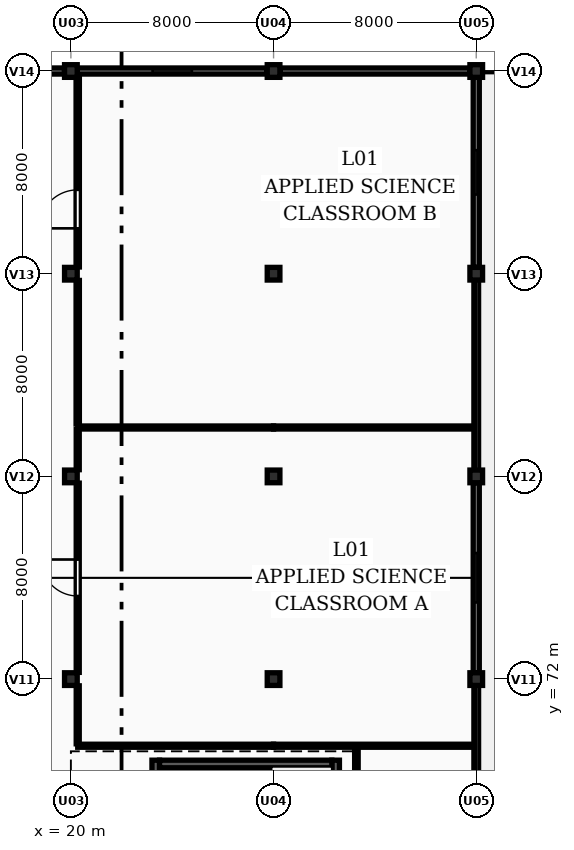
"""IFC4 building model, lengths in metres.
Left out: names, types, materials, properties, quantities, classifications, styles, units other than length and angle.
Written with IfcOpenShell. Run it as: python <this file> out.ifc"""

import sys

from ifc_helpers import new_model, si_unit, direction, frame, frame_2d, origin, origin_2d, place, context, subcontext, project, spatial, rectangle, extrude, element, fill, save


model = new_model("IFC4")
c1 = context("Model", 3, precision=1e-05, world=origin(), true_north=direction((0.0, 1.0)))
c2 = subcontext(c1, "Body", "Model", "MODEL_VIEW")
j1 = project(units=[si_unit("LENGTHUNIT", "METRE"), si_unit("PLANEANGLEUNIT", "RADIAN")], contexts=[c1])
p1 = place(None, origin())
s1 = spatial("IfcSite", under=j1, at=p1, CompositionType="ELEMENT")
p2 = place(p1, origin())
s2 = spatial("IfcBuilding", under=s1, at=p2, CompositionType="ELEMENT")
p3 = place(p2, frame((0.0, 0.0, 4.5)))
s3 = spatial("IfcBuildingStorey", under=s2, at=p3, CompositionType="ELEMENT", Elevation=4.5)
for number, where, z_axis, x_axis in (
    (1, (20.0, 72.0, 0.0), (0.0, 0.0, 1.0), (1.0, 0.0, 0.0)),
    (2, (20.0, 80.0, 0.0), (0.0, 0.0, 1.0), (1.0, 0.0, 0.0)),
    (3, (20.0, 88.0, 0.0), (0.0, 0.0, 1.0), (1.0, 0.0, 0.0)),
    (4, (20.0, 96.0, 0.0), (0.0, 0.0, 1.0), (1.0, 0.0, 0.0)),
    (5, (28.0, 72.0, 0.0), (0.0, 0.0, 1.0), (1.0, 0.0, 0.0)),
    (6, (28.0, 80.0, 0.0), (0.0, 0.0, 1.0), (1.0, 0.0, 0.0)),
    (7, (28.0, 88.0, 0.0), (0.0, 0.0, 1.0), (1.0, 0.0, 0.0)),
    (8, (28.0, 96.0, 0.0), (0.0, 0.0, 1.0), (1.0, 0.0, 0.0)),
    (9, (36.0, 72.0, 0.0), (0.0, 0.0, 1.0), (1.0, 0.0, 0.0)),
    (10, (36.0, 80.0, 0.0), (0.0, 0.0, 1.0), (1.0, 0.0, 0.0)),
    (11, (36.0, 88.0, 0.0), (0.0, 0.0, 1.0), (1.0, 0.0, 0.0)),
    (12, (36.0, 96.0, 0.0), (0.0, 0.0, 1.0), (1.0, 0.0, 0.0)),
):
    element("IfcColumn", number, at=place(p3, frame(where, z_axis=z_axis, x_axis=x_axis)), inside=s3, PredefinedType="COLUMN", context=c2, shape_type="SweptSolid", body=[
        extrude(rectangle(XDim=0.5, YDim=0.5, at=origin_2d()), origin(), (0.0, 0.0, 1.0), 3.9),
    ])
p4 = place(p3, frame((12.25, 96.0, 0.0), z_axis=(0.0, 0.0, 1.0), x_axis=(1.0, 0.0, 0.0)))
e13 = element("IfcWall", 13, at=p4, inside=s3, PredefinedType="SOLIDWALL", context=c2, shape_type="SweptSolid", body=[
    extrude(rectangle(XDim=7.5, YDim=0.24, at=frame_2d((3.75, 0.0))), origin(), (0.0, 0.0, 1.0), 3.0),
])
p5 = place(p4, frame((2.65, 0.0, 0.95)))
e14 = element("IfcOpeningElement", 14, at=p5, cuts=e13, PredefinedType="OPENING", context=c2, shape_type="SweptSolid", body=[
    extrude(rectangle(XDim=1.3, YDim=1.4, at=frame_2d((0.65, 0.7))), frame((0.0, 0.13, 0.0), z_axis=(0.0, -1.0, 0.0), x_axis=(1.0, 0.0, 0.0)), (0.0, 0.0, 1.0), 0.26),
])
p6 = place(p3, frame((20.25, 96.0, 0.0), z_axis=(0.0, 0.0, 1.0), x_axis=(1.0, 0.0, 0.0)))
e15 = element("IfcWall", 15, at=p6, inside=s3, PredefinedType="SOLIDWALL", context=c2, shape_type="SweptSolid", body=[
    extrude(rectangle(XDim=7.5, YDim=0.24, at=frame_2d((3.75, 0.0))), origin(), (0.0, 0.0, 1.0), 3.0),
])
p7 = place(p6, frame((2.975, 0.0, 0.95)))
e16 = element("IfcOpeningElement", 16, at=p7, cuts=e15, PredefinedType="OPENING", context=c2, shape_type="SweptSolid", body=[
    extrude(rectangle(XDim=1.55, YDim=1.4, at=frame_2d((0.775, 0.7))), frame((0.0, 0.13, 0.0), z_axis=(0.0, -1.0, 0.0), x_axis=(1.0, 0.0, 0.0)), (0.0, 0.0, 1.0), 0.26),
])
p8 = place(p3, frame((28.25, 96.0, 0.0), z_axis=(0.0, 0.0, 1.0), x_axis=(1.0, 0.0, 0.0)))
e17 = element("IfcWall", 17, at=p8, inside=s3, PredefinedType="SOLIDWALL", context=c2, shape_type="SweptSolid", body=[
    extrude(rectangle(XDim=7.5, YDim=0.24, at=frame_2d((3.75, 0.0))), origin(), (0.0, 0.0, 1.0), 3.0),
])
p9 = place(p3, frame((36.0, 95.75, 0.0), z_axis=(0.0, 0.0, 1.0), x_axis=(0.0, -1.0, 0.0)))
e18 = element("IfcWall", 18, at=p9, inside=s3, PredefinedType="SOLIDWALL", context=c2, shape_type="SweptSolid", body=[
    extrude(rectangle(XDim=7.5, YDim=0.24, at=frame_2d((3.75, 0.0))), origin(), (0.0, 0.0, 1.0), 3.0),
])
p10 = place(p9, frame((2.875, 0.0, 0.95)))
e19 = element("IfcOpeningElement", 19, at=p10, cuts=e18, PredefinedType="OPENING", context=c2, shape_type="SweptSolid", body=[
    extrude(rectangle(XDim=1.75, YDim=1.4, at=frame_2d((0.875, 0.7))), frame((0.0, 0.13, 0.0), z_axis=(0.0, -1.0, 0.0), x_axis=(1.0, 0.0, 0.0)), (0.0, 0.0, 1.0), 0.26),
])
p11 = place(p3, frame((36.0, 87.75, 0.0), z_axis=(0.0, 0.0, 1.0), x_axis=(0.0, -1.0, 0.0)))
e20 = element("IfcWall", 20, at=p11, inside=s3, PredefinedType="SOLIDWALL", context=c2, shape_type="SweptSolid", body=[
    extrude(rectangle(XDim=7.5, YDim=0.185, at=frame_2d((3.75, 0.0))), origin(), (0.0, 0.0, 1.0), 0.95),
])
p12 = place(p3, frame((36.0, 79.75, 0.0), z_axis=(0.0, 0.0, 1.0), x_axis=(0.0, -1.0, 0.0)))
e21 = element("IfcWall", 21, at=p12, inside=s3, PredefinedType="SOLIDWALL", context=c2, shape_type="SweptSolid", body=[
    extrude(rectangle(XDim=7.5, YDim=0.24, at=frame_2d((3.75, 0.0))), origin(), (0.0, 0.0, 1.0), 3.0),
])
p13 = place(p12, frame((2.775, 0.0, 0.95)))
e22 = element("IfcOpeningElement", 22, at=p13, cuts=e21, PredefinedType="OPENING", context=c2, shape_type="SweptSolid", body=[
    extrude(rectangle(XDim=1.95, YDim=1.4, at=frame_2d((0.975, 0.7))), frame((0.0, 0.13, 0.0), z_axis=(0.0, -1.0, 0.0), x_axis=(1.0, 0.0, 0.0)), (0.0, 0.0, 1.0), 0.26),
])
p14 = place(p3, frame((36.0, 71.75, 0.0), z_axis=(0.0, 0.0, 1.0), x_axis=(0.0, -1.0, 0.0)))
e23 = element("IfcWall", 23, at=p14, inside=s3, PredefinedType="SOLIDWALL", context=c2, shape_type="SweptSolid", body=[
    extrude(rectangle(XDim=7.5, YDim=0.185, at=frame_2d((3.75, 0.0))), origin(), (0.0, 0.0, 1.0), 0.95),
])
for number, where, z_axis, x_axis in (
    (24, (23.35, 64.7, 0.0), (0.0, 0.0, 1.0), (0.0, 1.0, 0.0)),
    (25, (30.45, 68.8, 0.0), (0.0, 0.0, 1.0), (0.0, -1.0, 0.0)),
):
    element("IfcWall", number, at=place(p3, frame(where, z_axis=z_axis, x_axis=x_axis)), inside=s3, PredefinedType="SHEAR", context=c2, shape_type="SweptSolid", body=[
        extrude(rectangle(XDim=4.1, YDim=0.3, at=frame_2d((2.05, 0.0))), origin(), (0.0, 0.0, 1.0), 3.65),
    ])
p15 = place(p3, frame((30.3, 68.65, 0.0), z_axis=(0.0, 0.0, 1.0), x_axis=(-1.0, 0.0, 0.0)))
e26 = element("IfcWall", 26, at=p15, inside=s3, PredefinedType="SHEAR", context=c2, shape_type="SweptSolid", body=[
    extrude(rectangle(XDim=6.8, YDim=0.3, at=frame_2d((3.4, 0.0))), origin(), (0.0, 0.0, 1.0), 3.65),
])
p16 = place(p3, frame((20.27, 69.37, 0.0), z_axis=(0.0, 0.0, 1.0), x_axis=(1.0, 0.0, 0.0)))
e27 = element("IfcWall", 27, at=p16, inside=s3, PredefinedType="PARTITIONING", context=c2, shape_type="SweptSolid", body=[
    extrude(rectangle(XDim=7.73, YDim=0.12, at=frame_2d((3.865, 0.0))), origin(), (0.0, 0.0, 1.0), 3.65),
])
p17 = place(p3, frame((28.0, 69.37, 0.0), z_axis=(0.0, 0.0, 1.0), x_axis=(1.0, 0.0, 0.0)))
e28 = element("IfcWall", 28, at=p17, inside=s3, PredefinedType="PARTITIONING", context=c2, shape_type="SweptSolid", body=[
    extrude(rectangle(XDim=7.865, YDim=0.12, at=frame_2d((3.933, 0.0))), origin(), (0.0, 0.0, 1.0), 3.65),
])
p18 = place(p3, frame((20.27, 81.93, 0.0), z_axis=(0.0, 0.0, 1.0), x_axis=(1.0, 0.0, 0.0)))
e29 = element("IfcWall", 29, at=p18, inside=s3, PredefinedType="PARTITIONING", context=c2, shape_type="SweptSolid", body=[
    extrude(rectangle(XDim=7.73, YDim=0.12, at=frame_2d((3.865, 0.0))), origin(), (0.0, 0.0, 1.0), 3.65),
])
p19 = place(p3, frame((28.0, 81.93, 0.0), z_axis=(0.0, 0.0, 1.0), x_axis=(1.0, 0.0, 0.0)))
e30 = element("IfcWall", 30, at=p19, inside=s3, PredefinedType="PARTITIONING", context=c2, shape_type="SweptSolid", body=[
    extrude(rectangle(XDim=7.865, YDim=0.12, at=frame_2d((3.933, 0.0))), origin(), (0.0, 0.0, 1.0), 3.65),
])
p20 = place(p3, frame((20.27, 69.445, 0.0), z_axis=(0.0, 0.0, 1.0), x_axis=(0.0, 1.0, 0.0)))
e31 = element("IfcWall", 31, at=p20, inside=s3, PredefinedType="PARTITIONING", context=c2, shape_type="SweptSolid", body=[
    extrude(rectangle(XDim=2.29, YDim=0.12, at=frame_2d((1.145, 0.0))), origin(), (0.0, 0.0, 1.0), 3.0),
])
p21 = place(p3, frame((20.27, 72.265, 0.0), z_axis=(0.0, 0.0, 1.0), x_axis=(0.0, 1.0, 0.0)))
e32 = element("IfcWall", 32, at=p21, inside=s3, PredefinedType="PARTITIONING", context=c2, shape_type="SweptSolid", body=[
    extrude(rectangle(XDim=7.47, YDim=0.12, at=frame_2d((3.735, 0.0))), origin(), (0.0, 0.0, 1.0), 3.0),
])
p22 = place(p21, frame((3.015, 0.0, 0.0)))
e33 = element("IfcOpeningElement", 33, at=p22, cuts=e32, PredefinedType="OPENING", context=c2, shape_type="SweptSolid", body=[
    extrude(rectangle(XDim=1.44, YDim=2.15, at=frame_2d((0.72, 1.075))), frame((0.0, 0.07, 0.0), z_axis=(0.0, -1.0, 0.0), x_axis=(1.0, 0.0, 0.0)), (0.0, 0.0, 1.0), 0.14),
])
p23 = place(p3, frame((20.27, 80.265, 0.0), z_axis=(0.0, 0.0, 1.0), x_axis=(0.0, 1.0, 0.0)))
e34 = element("IfcWall", 34, at=p23, inside=s3, PredefinedType="PARTITIONING", context=c2, shape_type="SweptSolid", body=[
    extrude(rectangle(XDim=1.59, YDim=0.12, at=frame_2d((0.795, 0.0))), origin(), (0.0, 0.0, 1.0), 3.0),
])
p24 = place(p3, frame((20.27, 82.07, 0.0), z_axis=(0.0, 0.0, 1.0), x_axis=(0.0, 1.0, 0.0)))
e35 = element("IfcWall", 35, at=p24, inside=s3, PredefinedType="PARTITIONING", context=c2, shape_type="SweptSolid", body=[
    extrude(rectangle(XDim=5.665, YDim=0.13, at=frame_2d((2.833, 0.0))), origin(), (0.0, 0.0, 1.0), 3.0),
])
p25 = place(p3, frame((20.27, 88.265, 0.0), z_axis=(0.0, 0.0, 1.0), x_axis=(0.0, 1.0, 0.0)))
e36 = element("IfcWall", 36, at=p25, inside=s3, PredefinedType="PARTITIONING", context=c2, shape_type="SweptSolid", body=[
    extrude(rectangle(XDim=7.47, YDim=0.13, at=frame_2d((3.735, 0.0))), origin(), (0.0, 0.0, 1.0), 3.0),
])
p26 = place(p25, frame((1.525, 0.0, 0.0)))
e37 = element("IfcOpeningElement", 37, at=p26, cuts=e36, PredefinedType="OPENING", context=c2, shape_type="SweptSolid", body=[
    extrude(rectangle(XDim=1.52, YDim=2.2, at=frame_2d((0.76, 1.1))), frame((0.0, 0.075, 0.0), z_axis=(0.0, -1.0, 0.0), x_axis=(1.0, 0.0, 0.0)), (0.0, 0.0, 1.0), 0.15),
])
p27 = place(p3, frame((31.27, 64.755, 0.0), z_axis=(0.0, 0.0, 1.0), x_axis=(0.0, 1.0, 0.0)))
e38 = element("IfcWall", 38, at=p27, inside=s3, PredefinedType="PARTITIONING", context=c2, shape_type="SweptSolid", body=[
    extrude(rectangle(XDim=4.475, YDim=0.14, at=frame_2d((2.238, 0.0))), origin(), (0.0, 0.0, 1.0), 3.65),
])
p28 = place(p7, origin())
e39 = element("IfcWindow", 39, at=p28, inside=s3, PartitioningType="SINGLE_PANEL", PredefinedType="WINDOW", context=c2, shape_type="SweptSolid", body=[
    extrude(rectangle(XDim=1.55, YDim=1.4, at=frame_2d((0.775, 0.7))), frame((0.0, 0.03, 0.0), z_axis=(0.0, -1.0, 0.0), x_axis=(1.0, 0.0, 0.0)), (0.0, 0.0, 1.0), 0.06),
])
fill(e16, e39)
p29 = place(p10, origin())
e40 = element("IfcWindow", 40, at=p29, inside=s3, PartitioningType="DOUBLE_PANEL_VERTICAL", PredefinedType="WINDOW", context=c2, shape_type="SweptSolid", body=[
    extrude(rectangle(XDim=1.75, YDim=1.4, at=frame_2d((0.875, 0.7))), frame((0.0, 0.03, 0.0), z_axis=(0.0, -1.0, 0.0), x_axis=(1.0, 0.0, 0.0)), (0.0, 0.0, 1.0), 0.06),
])
fill(e19, e40)
p30 = place(p13, origin())
e41 = element("IfcWindow", 41, at=p30, inside=s3, PartitioningType="DOUBLE_PANEL_VERTICAL", PredefinedType="WINDOW", context=c2, shape_type="SweptSolid", body=[
    extrude(rectangle(XDim=1.95, YDim=1.4, at=frame_2d((0.975, 0.7))), frame((0.0, 0.03, 0.0), z_axis=(0.0, -1.0, 0.0), x_axis=(1.0, 0.0, 0.0)), (0.0, 0.0, 1.0), 0.06),
])
fill(e22, e41)
p31 = place(p22, origin())
e42 = element("IfcDoor", 42, at=p31, inside=s3, OperationType="SINGLE_SWING_RIGHT", PredefinedType="DOOR", context=c2, shape_type="SweptSolid", body=[
    extrude(rectangle(XDim=1.44, YDim=2.15, at=frame_2d((0.72, 1.075))), frame((0.0, 0.025, 0.0), z_axis=(0.0, -1.0, 0.0), x_axis=(1.0, 0.0, 0.0)), (0.0, 0.0, 1.0), 0.05),
])
fill(e33, e42)
p32 = place(p26, origin())
e43 = element("IfcDoor", 43, at=p32, inside=s3, OperationType="SINGLE_SWING_LEFT", PredefinedType="DOOR", context=c2, shape_type="SweptSolid", body=[
    extrude(rectangle(XDim=1.52, YDim=2.2, at=frame_2d((0.76, 1.1))), frame((0.0, 0.025, 0.0), z_axis=(0.0, -1.0, 0.0), x_axis=(1.0, 0.0, 0.0)), (0.0, 0.0, 1.0), 0.05),
])
fill(e37, e43)
save(model, sys.argv[1])
